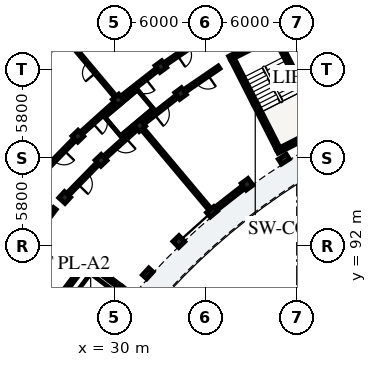
"""IFC4 building model, lengths in metres.
Left out: names, types, materials, properties, quantities, classifications, styles, units other than length and angle.
Written with IfcOpenShell. Run it as: python <this file> out.ifc"""

import sys

from ifc_helpers import new_model, si_unit, direction, frame, frame_2d, origin, origin_2d, place, context, subcontext, project, spatial, rectangle, extrude, element, fill, save


model = new_model("IFC4")
c1 = context("Model", 3, precision=1e-05, world=origin(), true_north=direction((0.0, 1.0)))
c2 = subcontext(c1, "Body", "Model", "MODEL_VIEW")
j1 = project(units=[si_unit("LENGTHUNIT", "METRE"), si_unit("PLANEANGLEUNIT", "RADIAN")], contexts=[c1])
p1 = place(None, origin())
s1 = spatial("IfcSite", under=j1, at=p1, CompositionType="ELEMENT")
p2 = place(p1, origin())
s2 = spatial("IfcBuilding", under=s1, at=p2, CompositionType="ELEMENT")
p3 = place(p2, frame((0.0, 0.0, 15.56)))
s3 = spatial("IfcBuildingStorey", under=s2, at=p3, CompositionType="ELEMENT", Elevation=15.56)
p4 = place(p3, frame((37.773, 104.296, 0.0), z_axis=(0.0, 0.0, 1.0), x_axis=(0.453992276384, -0.891005618941, 0.0)))
e1 = element("IfcWall", 1, at=p4, inside=s3, PredefinedType="SHEAR", context=c2, shape_type="SweptSolid", body=[
    extrude(rectangle(XDim=6.6, YDim=0.28, at=frame_2d((3.3, 0.0))), origin(), (0.0, 0.0, 1.0), 3.11),
])
for number, where, z_axis, x_axis in (
    (2, (40.709, 98.227, 0.0), (0.0, 0.0, 1.0), (0.891, 0.454, 0.0)),
    (3, (37.585, 104.357, 0.0), (0.0, 0.0, 1.0), (0.891, 0.454, 0.0)),
):
    element("IfcWall", number, at=place(p3, frame(where, z_axis=z_axis, x_axis=x_axis)), inside=s3, PredefinedType="SHEAR", context=c2, shape_type="SweptSolid", body=[
        extrude(rectangle(XDim=3.48, YDim=0.28, at=frame_2d((1.74, 0.0))), origin(), (0.0, 0.0, 1.0), 3.11),
    ])
p5 = place(p3, frame((40.625, 105.748, 0.0), z_axis=(0.0, 0.0, 1.0), x_axis=(0.453992276384, -0.891005618941, 0.0)))
e4 = element("IfcWall", 4, at=p5, inside=s3, PredefinedType="SHEAR", context=c2, shape_type="SweptSolid", body=[
    extrude(rectangle(XDim=6.6, YDim=0.28, at=frame_2d((3.3, 0.0))), origin(), (0.0, 0.0, 1.0), 3.11),
])
p6 = place(p5, frame((0.22, 0.0, 0.0)))
e5 = element("IfcOpeningElement", 5, at=p6, cuts=e4, PredefinedType="OPENING", context=c2, shape_type="SweptSolid", body=[
    extrude(rectangle(XDim=1.05, YDim=2.15, at=frame_2d((0.525, 1.075))), frame((0.0, 0.15, 0.0), z_axis=(0.0, -1.0, 0.0), x_axis=(1.0, 0.0, 0.0)), (0.0, 0.0, 1.0), 0.3),
])
p7 = place(p3, frame((23.125, 90.453, 0.0), z_axis=(0.0, 0.0, 1.0), x_axis=(0.798639633744, -0.601809550782, 0.0)))
e6 = element("IfcWall", 6, at=p7, inside=s3, PredefinedType="SHEAR", context=c2, shape_type="SweptSolid", body=[
    extrude(rectangle(XDim=6.6, YDim=0.28, at=frame_2d((3.3, 0.0))), origin(), (0.0, 0.0, 1.0), 3.11),
])
p8 = place(p7, frame((0.22, 0.0, 0.0)))
e7 = element("IfcOpeningElement", 7, at=p8, cuts=e6, PredefinedType="OPENING", context=c2, shape_type="SweptSolid", body=[
    extrude(rectangle(XDim=1.05, YDim=2.15, at=frame_2d((0.525, 1.075))), frame((0.0, 0.15, 0.0), z_axis=(0.0, -1.0, 0.0), x_axis=(1.0, 0.0, 0.0)), (0.0, 0.0, 1.0), 0.3),
])
p9 = place(p3, frame((26.294, 88.453, 0.0), z_axis=(0.0, 0.0, 1.0), x_axis=(0.601819781152, 0.798631924615, 0.0)))
e8 = element("IfcWall", 8, at=p9, inside=s3, PredefinedType="SHEAR", context=c2, shape_type="SweptSolid", body=[
    extrude(rectangle(XDim=3.26, YDim=0.23, at=frame_2d((1.63, 0.0))), origin(), (0.0, 0.0, 1.0), 3.11),
])
p10 = place(p9, frame((0.9, 0.0, 0.0)))
e9 = element("IfcOpeningElement", 9, at=p10, cuts=e8, PredefinedType="OPENING", context=c2, shape_type="SweptSolid", body=[
    extrude(rectangle(XDim=1.0, YDim=2.15, at=frame_2d((0.5, 1.075))), frame((0.0, 0.125, 0.0), z_axis=(0.0, -1.0, 0.0), x_axis=(1.0, 0.0, 0.0)), (0.0, 0.0, 1.0), 0.25),
])
p11 = place(p3, frame((28.634, 86.69, 0.0), z_axis=(0.0, 0.0, 1.0), x_axis=(0.601819781152, 0.798631924615, 0.0)))
e10 = element("IfcWall", 10, at=p11, inside=s3, PredefinedType="SHEAR", context=c2, shape_type="SweptSolid", body=[
    extrude(rectangle(XDim=3.26, YDim=0.23, at=frame_2d((1.63, 0.0))), origin(), (0.0, 0.0, 1.0), 3.11),
])
p12 = place(p3, frame((28.279, 90.896, 0.0), z_axis=(0.0, 0.0, 1.0), x_axis=(0.798608971494, -0.601850239387, 0.0)))
e11 = element("IfcWall", 11, at=p12, inside=s3, PredefinedType="SHEAR", context=c2, shape_type="SweptSolid", body=[
    extrude(rectangle(XDim=2.7, YDim=0.23, at=frame_2d((1.35, 0.0))), origin(), (0.0, 0.0, 1.0), 3.11),
])
p13 = place(p3, frame((41.153, 97.712, 0.0), z_axis=(0.0, 0.0, 1.0), x_axis=(-0.536481603385, 0.843912015099, 0.0)))
e12 = element("IfcColumn", 12, at=p13, inside=s3, PredefinedType="PILASTER", context=c2, shape_type="SweptSolid", body=[
    extrude(rectangle(XDim=0.38, YDim=0.62, at=origin_2d()), origin(), (0.0, 0.0, 1.0), 3.11),
])
for number, where, z_axis, x_axis in (
    (13, (38.734, 96.059, 0.0), (0.0, 0.0, 1.0), (-0.591, 0.807, 0.0)),
    (14, (34.361, 102.029, 0.0), (0.0, 0.0, 1.0), (-0.591, 0.807, 0.0)),
    (15, (33.061, 103.804, 0.0), (0.0, 0.0, 1.0), (-0.591, 0.807, 0.0)),
):
    element("IfcColumn", number, at=place(p3, frame(where, z_axis=z_axis, x_axis=x_axis)), inside=s3, PredefinedType="COLUMN", context=c2, shape_type="SweptSolid", body=[
        extrude(rectangle(XDim=0.55, YDim=0.55, at=origin_2d()), origin(), (0.0, 0.0, 1.0), 3.11),
    ])
p14 = place(p3, frame((36.428, 94.251, 0.0), z_axis=(0.0, 0.0, 1.0), x_axis=(-0.642787636427, 0.766044420681, 0.0)))
e16 = element("IfcColumn", 16, at=p14, inside=s3, PredefinedType="PILASTER", context=c2, shape_type="SweptSolid", body=[
    extrude(rectangle(XDim=0.38, YDim=0.62, at=origin_2d()), origin(), (0.0, 0.0, 1.0), 3.11),
])
for number, where, z_axis, x_axis in (
    (17, (31.671, 99.919, 0.0), (0.0, 0.0, 1.0), (-0.643, 0.766, 0.0)),
    (18, (30.257, 101.605, 0.0), (0.0, 0.0, 1.0), (-0.643, 0.766, 0.0)),
    (19, (34.247, 92.294, 0.0), (0.0, 0.0, 1.0), (-0.692, 0.722, 0.0)),
    (20, (29.127, 97.637, 0.0), (0.0, 0.0, 1.0), (-0.692, 0.722, 0.0)),
    (21, (27.605, 99.226, 0.0), (0.0, 0.0, 1.0), (-0.692, 0.722, 0.0)),
):
    element("IfcColumn", number, at=place(p3, frame(where, z_axis=z_axis, x_axis=x_axis)), inside=s3, PredefinedType="COLUMN", context=c2, shape_type="SweptSolid", body=[
        extrude(rectangle(XDim=0.55, YDim=0.55, at=origin_2d()), origin(), (0.0, 0.0, 1.0), 3.11),
    ])
p15 = place(p3, frame((32.199, 90.198, 0.0), z_axis=(0.0, 0.0, 1.0), x_axis=(-0.737932089665, 0.674874974378, 0.0)))
e22 = element("IfcColumn", 22, at=p15, inside=s3, PredefinedType="PILASTER", context=c2, shape_type="SweptSolid", body=[
    extrude(rectangle(XDim=0.38, YDim=0.62, at=origin_2d()), origin(), (0.0, 0.0, 1.0), 3.11),
])
p16 = place(p3, frame((26.738, 95.192, 0.0), z_axis=(0.0, 0.0, 1.0), x_axis=(-0.737932089665, 0.674874974378, 0.0)))
e23 = element("IfcColumn", 23, at=p16, inside=s3, PredefinedType="COLUMN", context=c2, shape_type="SweptSolid", body=[
    extrude(rectangle(XDim=0.55, YDim=0.55, at=origin_2d()), origin(), (0.0, 0.0, 1.0), 3.11),
])
p17 = place(p3, frame((38.541, 95.908, 0.0), z_axis=(0.0, 0.0, 1.0), x_axis=(-0.786831325151, -0.617168101704, 0.0)))
e24 = element("IfcWall", 24, at=p17, inside=s3, PredefinedType="SOLIDWALL", context=c2, shape_type="SweptSolid", body=[
    extrude(rectangle(XDim=2.525, YDim=0.245, at=frame_2d((1.263, 0.0))), origin(), (0.0, 0.0, 1.0), 2.355),
])
p18 = place(p17, frame((0.383, 0.0, 0.35)))
e25 = element("IfcOpeningElement", 25, at=p18, cuts=e24, PredefinedType="OPENING", context=c2, shape_type="SweptSolid", body=[
    extrude(rectangle(XDim=1.76, YDim=1.635, at=frame_2d((0.88, 0.817))), frame((0.0, 0.133, 0.0), z_axis=(0.0, -1.0, 0.0), x_axis=(1.0, 0.0, 0.0)), (0.0, 0.0, 1.0), 0.265),
])
p19 = place(p3, frame((26.603, 105.711, 0.0), z_axis=(0.0, 0.0, 1.0), x_axis=(-0.744413726571, -0.667718656092, 0.0)))
e26 = element("IfcWall", 26, at=p19, inside=s3, PredefinedType="SOLIDWALL", context=c2, shape_type="SweptSolid", body=[
    extrude(rectangle(XDim=3.521, YDim=0.245, at=frame_2d((1.76, 0.0))), origin(), (0.0, 0.0, 1.0), 2.355),
])
p20 = place(p19, frame((0.96, 0.0, 0.55)))
e27 = element("IfcOpeningElement", 27, at=p20, cuts=e26, PredefinedType="OPENING", context=c2, shape_type="SweptSolid", body=[
    extrude(rectangle(XDim=1.6, YDim=1.535, at=frame_2d((0.8, 0.768))), frame((0.0, 0.133, 0.0), z_axis=(0.0, -1.0, 0.0), x_axis=(1.0, 0.0, 0.0)), (0.0, 0.0, 1.0), 0.265),
])
p21 = place(p3, frame((23.139, 90.555, 0.0), z_axis=(0.0, 0.0, 1.0), x_axis=(0.601792209296, 0.79865270101, 0.0)))
e28 = element("IfcWall", 28, at=p21, inside=s3, PredefinedType="PARTITIONING", context=c2, shape_type="SweptSolid", body=[
    extrude(rectangle(XDim=4.9, YDim=0.22, at=frame_2d((2.45, 0.0))), origin(), (0.0, 0.0, 1.0), 2.34),
])
p22 = place(p21, frame((1.95, 0.0, 0.0)))
e29 = element("IfcOpeningElement", 29, at=p22, cuts=e28, PredefinedType="OPENING", context=c2, shape_type="SweptSolid", body=[
    extrude(rectangle(XDim=0.98, YDim=2.14, at=frame_2d((0.49, 1.07))), frame((0.0, 0.12, 0.0), z_axis=(0.0, -1.0, 0.0), x_axis=(1.0, 0.0, 0.0)), (0.0, 0.0, 1.0), 0.24),
])
p23 = place(p3, frame((35.714, 105.616, 0.0), z_axis=(0.0, 0.0, 1.0), x_axis=(-0.825779671787, -0.563992848947, 0.0)))
e30 = element("IfcWall", 30, at=p23, inside=s3, PredefinedType="PARTITIONING", context=c2, shape_type="SweptSolid", body=[
    extrude(rectangle(XDim=2.863, YDim=0.205, at=frame_2d((1.432, 0.0))), origin(), (0.0, 0.0, 1.0), 2.37),
])
p24 = place(p23, frame((0.967, 0.0, 0.0)))
e31 = element("IfcOpeningElement", 31, at=p24, cuts=e30, PredefinedType="OPENING", context=c2, shape_type="SweptSolid", body=[
    extrude(rectangle(XDim=0.93, YDim=2.12, at=frame_2d((0.465, 1.06))), frame((0.0, 0.113, 0.0), z_axis=(0.0, -1.0, 0.0), x_axis=(1.0, 0.0, 0.0)), (0.0, 0.0, 1.0), 0.225),
])
p25 = place(p3, frame((36.895, 103.76, 0.0), z_axis=(0.0, 0.0, 1.0), x_axis=(-0.825752009056, -0.56403334967, 0.0)))
e32 = element("IfcWall", 32, at=p25, inside=s3, PredefinedType="PARTITIONING", context=c2, shape_type="SweptSolid", body=[
    extrude(rectangle(XDim=2.718, YDim=0.205, at=frame_2d((1.359, 0.0))), origin(), (0.0, 0.0, 1.0), 2.37),
])
p26 = place(p25, frame((0.894, 0.0, 0.0)))
e33 = element("IfcOpeningElement", 33, at=p26, cuts=e32, PredefinedType="OPENING", context=c2, shape_type="SweptSolid", body=[
    extrude(rectangle(XDim=0.93, YDim=2.12, at=frame_2d((0.465, 1.06))), frame((0.0, 0.113, 0.0), z_axis=(0.0, -1.0, 0.0), x_axis=(1.0, 0.0, 0.0)), (0.0, 0.0, 1.0), 0.225),
])
p27 = place(p3, frame((32.785, 103.588, 0.0), z_axis=(0.0, 0.0, 1.0), x_axis=(-0.786806323554, -0.617199975061, 0.0)))
e34 = element("IfcWall", 34, at=p27, inside=s3, PredefinedType="PARTITIONING", context=c2, shape_type="SweptSolid", body=[
    extrude(rectangle(XDim=2.863, YDim=0.205, at=frame_2d((1.432, 0.0))), origin(), (0.0, 0.0, 1.0), 2.37),
])
p28 = place(p27, frame((0.937, 0.0, 0.0)))
e35 = element("IfcOpeningElement", 35, at=p28, cuts=e34, PredefinedType="OPENING", context=c2, shape_type="SweptSolid", body=[
    extrude(rectangle(XDim=0.99, YDim=2.16, at=frame_2d((0.495, 1.08))), frame((0.0, 0.113, 0.0), z_axis=(0.0, -1.0, 0.0), x_axis=(1.0, 0.0, 0.0)), (0.0, 0.0, 1.0), 0.225),
])
p29 = place(p3, frame((34.085, 101.813, 0.0), z_axis=(0.0, 0.0, 1.0), x_axis=(-0.786835457019, -0.617162833924, 0.0)))
e36 = element("IfcWall", 36, at=p29, inside=s3, PredefinedType="PARTITIONING", context=c2, shape_type="SweptSolid", body=[
    extrude(rectangle(XDim=2.718, YDim=0.205, at=frame_2d((1.359, 0.0))), origin(), (0.0, 0.0, 1.0), 2.37),
])
p30 = place(p29, frame((0.864, 0.0, 0.0)))
e37 = element("IfcOpeningElement", 37, at=p30, cuts=e36, PredefinedType="OPENING", context=c2, shape_type="SweptSolid", body=[
    extrude(rectangle(XDim=0.99, YDim=2.16, at=frame_2d((0.495, 1.08))), frame((0.0, 0.113, 0.0), z_axis=(0.0, -1.0, 0.0), x_axis=(1.0, 0.0, 0.0)), (0.0, 0.0, 1.0), 0.225),
])
p31 = place(p3, frame((30.0, 101.911, 0.0), z_axis=(0.0, 0.0, 1.0), x_axis=(-0.642811926223, 0.766024038465, 0.0)))
e38 = element("IfcWall", 38, at=p31, inside=s3, PredefinedType="PLUMBINGWALL", context=c2, shape_type="SweptSolid", body=[
    extrude(rectangle(XDim=4.7, YDim=0.14, at=frame_2d((2.35, 0.0))), origin(), (0.0, 0.0, 1.0), 2.37),
])
p32 = place(p31, frame((1.92, 0.0, 0.0)))
e39 = element("IfcOpeningElement", 39, at=p32, cuts=e38, PredefinedType="OPENING", context=c2, shape_type="SweptSolid", body=[
    extrude(rectangle(XDim=0.86, YDim=2.06, at=frame_2d((0.43, 1.03))), frame((0.0, 0.08, 0.0), z_axis=(0.0, -1.0, 0.0), x_axis=(1.0, 0.0, 0.0)), (0.0, 0.0, 1.0), 0.16),
])
p33 = place(p3, frame((36.171, 94.557, 0.0), z_axis=(0.0, 0.0, 1.0), x_axis=(-0.642789470807, 0.766042881449, 0.0)))
e40 = element("IfcWall", 40, at=p33, inside=s3, PredefinedType="PARTITIONING", context=c2, shape_type="SweptSolid", body=[
    extrude(rectangle(XDim=6.6, YDim=0.185, at=frame_2d((3.3, 0.0))), origin(), (0.0, 0.0, 1.0), 2.37),
])
p34 = place(p3, frame((29.997, 101.371, 0.0), z_axis=(0.0, 0.0, 1.0), x_axis=(-0.744433521088, -0.667696587291, 0.0)))
e41 = element("IfcWall", 41, at=p34, inside=s3, PredefinedType="PARTITIONING", context=c2, shape_type="SweptSolid", body=[
    extrude(rectangle(XDim=2.863, YDim=0.205, at=frame_2d((1.432, 0.0))), origin(), (0.0, 0.0, 1.0), 2.37),
])
p35 = place(p34, frame((0.947, 0.0, 0.0)))
e42 = element("IfcOpeningElement", 42, at=p35, cuts=e41, PredefinedType="OPENING", context=c2, shape_type="SweptSolid", body=[
    extrude(rectangle(XDim=0.97, YDim=2.15, at=frame_2d((0.485, 1.075))), frame((0.0, 0.113, 0.0), z_axis=(0.0, -1.0, 0.0), x_axis=(1.0, 0.0, 0.0)), (0.0, 0.0, 1.0), 0.225),
])
p36 = place(p3, frame((31.411, 99.686, 0.0), z_axis=(0.0, 0.0, 1.0), x_axis=(-0.744418559135, -0.667713268413, 0.0)))
e43 = element("IfcWall", 43, at=p36, inside=s3, PredefinedType="PARTITIONING", context=c2, shape_type="SweptSolid", body=[
    extrude(rectangle(XDim=2.718, YDim=0.205, at=frame_2d((1.359, 0.0))), origin(), (0.0, 0.0, 1.0), 2.37),
])
p37 = place(p36, frame((0.874, 0.0, 0.0)))
e44 = element("IfcOpeningElement", 44, at=p37, cuts=e43, PredefinedType="OPENING", context=c2, shape_type="SweptSolid", body=[
    extrude(rectangle(XDim=0.97, YDim=2.15, at=frame_2d((0.485, 1.075))), frame((0.0, 0.113, 0.0), z_axis=(0.0, -1.0, 0.0), x_axis=(1.0, 0.0, 0.0)), (0.0, 0.0, 1.0), 0.225),
])
p38 = place(p3, frame((27.36, 98.975, 0.0), z_axis=(0.0, 0.0, 1.0), x_axis=(-0.698787219683, -0.715329589496, 0.0)))
e45 = element("IfcWall", 45, at=p38, inside=s3, PredefinedType="PARTITIONING", context=c2, shape_type="SweptSolid", body=[
    extrude(rectangle(XDim=2.863, YDim=0.205, at=frame_2d((1.432, 0.0))), origin(), (0.0, 0.0, 1.0), 2.37),
])
p39 = place(p38, frame((0.957, 0.0, 0.0)))
e46 = element("IfcOpeningElement", 46, at=p39, cuts=e45, PredefinedType="OPENING", context=c2, shape_type="SweptSolid", body=[
    extrude(rectangle(XDim=0.95, YDim=2.13, at=frame_2d((0.475, 1.065))), frame((0.0, 0.113, 0.0), z_axis=(0.0, -1.0, 0.0), x_axis=(1.0, 0.0, 0.0)), (0.0, 0.0, 1.0), 0.225),
])
p40 = place(p3, frame((28.882, 97.387, 0.0), z_axis=(0.0, 0.0, 1.0), x_axis=(-0.698840007829, -0.715278018296, 0.0)))
e47 = element("IfcWall", 47, at=p40, inside=s3, PredefinedType="PARTITIONING", context=c2, shape_type="SweptSolid", body=[
    extrude(rectangle(XDim=2.718, YDim=0.205, at=frame_2d((1.359, 0.0))), origin(), (0.0, 0.0, 1.0), 2.37),
])
p41 = place(p40, frame((0.884, 0.0, 0.0)))
e48 = element("IfcOpeningElement", 48, at=p41, cuts=e47, PredefinedType="OPENING", context=c2, shape_type="SweptSolid", body=[
    extrude(rectangle(XDim=0.95, YDim=2.13, at=frame_2d((0.475, 1.065))), frame((0.0, 0.113, 0.0), z_axis=(0.0, -1.0, 0.0), x_axis=(1.0, 0.0, 0.0)), (0.0, 0.0, 1.0), 0.225),
])
p42 = place(p18, origin())
e49 = element("IfcWindow", 49, at=p42, inside=s3, PartitioningType="SINGLE_PANEL", PredefinedType="WINDOW", context=c2, shape_type="SweptSolid", body=[
    extrude(rectangle(XDim=1.76, YDim=1.635, at=frame_2d((0.88, 0.817))), frame((0.0, 0.03, 0.0), z_axis=(0.0, -1.0, 0.0), x_axis=(1.0, 0.0, 0.0)), (0.0, 0.0, 1.0), 0.06),
])
fill(e25, e49)
p43 = place(p6, origin())
e50 = element("IfcDoor", 50, at=p43, inside=s3, OperationType="SINGLE_SWING_LEFT", PredefinedType="DOOR", context=c2, shape_type="SweptSolid", body=[
    extrude(rectangle(XDim=1.05, YDim=2.15, at=frame_2d((0.525, 1.075))), frame((0.0, 0.025, 0.0), z_axis=(0.0, -1.0, 0.0), x_axis=(1.0, 0.0, 0.0)), (0.0, 0.0, 1.0), 0.05),
])
fill(e5, e50)
p44 = place(p10, origin())
e51 = element("IfcDoor", 51, at=p44, inside=s3, OperationType="DOUBLE_DOOR_SLIDING", PredefinedType="DOOR", context=c2, shape_type="SweptSolid", body=[
    extrude(rectangle(XDim=1.0, YDim=2.15, at=frame_2d((0.5, 1.075))), frame((0.0, 0.025, 0.0), z_axis=(0.0, -1.0, 0.0), x_axis=(1.0, 0.0, 0.0)), (0.0, 0.0, 1.0), 0.05),
])
fill(e9, e51)
p45 = place(p24, origin())
e52 = element("IfcDoor", 52, at=p45, inside=s3, OperationType="SINGLE_SWING_RIGHT", PredefinedType="DOOR", context=c2, shape_type="SweptSolid", body=[
    extrude(rectangle(XDim=0.93, YDim=2.12, at=frame_2d((0.465, 1.06))), frame((0.0, 0.025, 0.0), z_axis=(0.0, -1.0, 0.0), x_axis=(1.0, 0.0, 0.0)), (0.0, 0.0, 1.0), 0.05),
])
fill(e31, e52)
p46 = place(p26, origin())
e53 = element("IfcDoor", 53, at=p46, inside=s3, OperationType="SINGLE_SWING_LEFT", PredefinedType="DOOR", context=c2, shape_type="SweptSolid", body=[
    extrude(rectangle(XDim=0.93, YDim=2.12, at=frame_2d((0.465, 1.06))), frame((0.0, 0.025, 0.0), z_axis=(0.0, -1.0, 0.0), x_axis=(1.0, 0.0, 0.0)), (0.0, 0.0, 1.0), 0.05),
])
fill(e33, e53)
p47 = place(p28, origin())
e54 = element("IfcDoor", 54, at=p47, inside=s3, OperationType="SINGLE_SWING_LEFT", PredefinedType="DOOR", context=c2, shape_type="SweptSolid", body=[
    extrude(rectangle(XDim=0.99, YDim=2.16, at=frame_2d((0.495, 1.08))), frame((0.0, 0.025, 0.0), z_axis=(0.0, -1.0, 0.0), x_axis=(1.0, 0.0, 0.0)), (0.0, 0.0, 1.0), 0.05),
])
fill(e35, e54)
p48 = place(p30, origin())
e55 = element("IfcDoor", 55, at=p48, inside=s3, OperationType="SINGLE_SWING_RIGHT", PredefinedType="DOOR", context=c2, shape_type="SweptSolid", body=[
    extrude(rectangle(XDim=0.99, YDim=2.16, at=frame_2d((0.495, 1.08))), frame((0.0, 0.025, 0.0), z_axis=(0.0, -1.0, 0.0), x_axis=(1.0, 0.0, 0.0)), (0.0, 0.0, 1.0), 0.05),
])
fill(e37, e55)
p49 = place(p32, origin())
e56 = element("IfcDoor", 56, at=p49, inside=s3, OperationType="SINGLE_SWING_LEFT", PredefinedType="DOOR", context=c2, shape_type="SweptSolid", body=[
    extrude(rectangle(XDim=0.86, YDim=2.06, at=frame_2d((0.43, 1.03))), frame((0.0, 0.025, 0.0), z_axis=(0.0, -1.0, 0.0), x_axis=(1.0, 0.0, 0.0)), (0.0, 0.0, 1.0), 0.05),
])
fill(e39, e56)
p50 = place(p35, origin())
e57 = element("IfcDoor", 57, at=p50, inside=s3, OperationType="SINGLE_SWING_RIGHT", PredefinedType="DOOR", context=c2, shape_type="SweptSolid", body=[
    extrude(rectangle(XDim=0.97, YDim=2.15, at=frame_2d((0.485, 1.075))), frame((0.0, 0.025, 0.0), z_axis=(0.0, -1.0, 0.0), x_axis=(1.0, 0.0, 0.0)), (0.0, 0.0, 1.0), 0.05),
])
fill(e42, e57)
p51 = place(p37, origin())
e58 = element("IfcDoor", 58, at=p51, inside=s3, OperationType="SINGLE_SWING_LEFT", PredefinedType="DOOR", context=c2, shape_type="SweptSolid", body=[
    extrude(rectangle(XDim=0.97, YDim=2.15, at=frame_2d((0.485, 1.075))), frame((0.0, 0.025, 0.0), z_axis=(0.0, -1.0, 0.0), x_axis=(1.0, 0.0, 0.0)), (0.0, 0.0, 1.0), 0.05),
])
fill(e44, e58)
p52 = place(p39, origin())
e59 = element("IfcDoor", 59, at=p52, inside=s3, OperationType="SINGLE_SWING_LEFT", PredefinedType="DOOR", context=c2, shape_type="SweptSolid", body=[
    extrude(rectangle(XDim=0.95, YDim=2.13, at=frame_2d((0.475, 1.065))), frame((0.0, 0.025, 0.0), z_axis=(0.0, -1.0, 0.0), x_axis=(1.0, 0.0, 0.0)), (0.0, 0.0, 1.0), 0.05),
])
fill(e46, e59)
p53 = place(p41, origin())
e60 = element("IfcDoor", 60, at=p53, inside=s3, OperationType="SINGLE_SWING_RIGHT", PredefinedType="DOOR", context=c2, shape_type="SweptSolid", body=[
    extrude(rectangle(XDim=0.95, YDim=2.13, at=frame_2d((0.475, 1.065))), frame((0.0, 0.025, 0.0), z_axis=(0.0, -1.0, 0.0), x_axis=(1.0, 0.0, 0.0)), (0.0, 0.0, 1.0), 0.05),
])
fill(e48, e60)
save(model, sys.argv[1])
